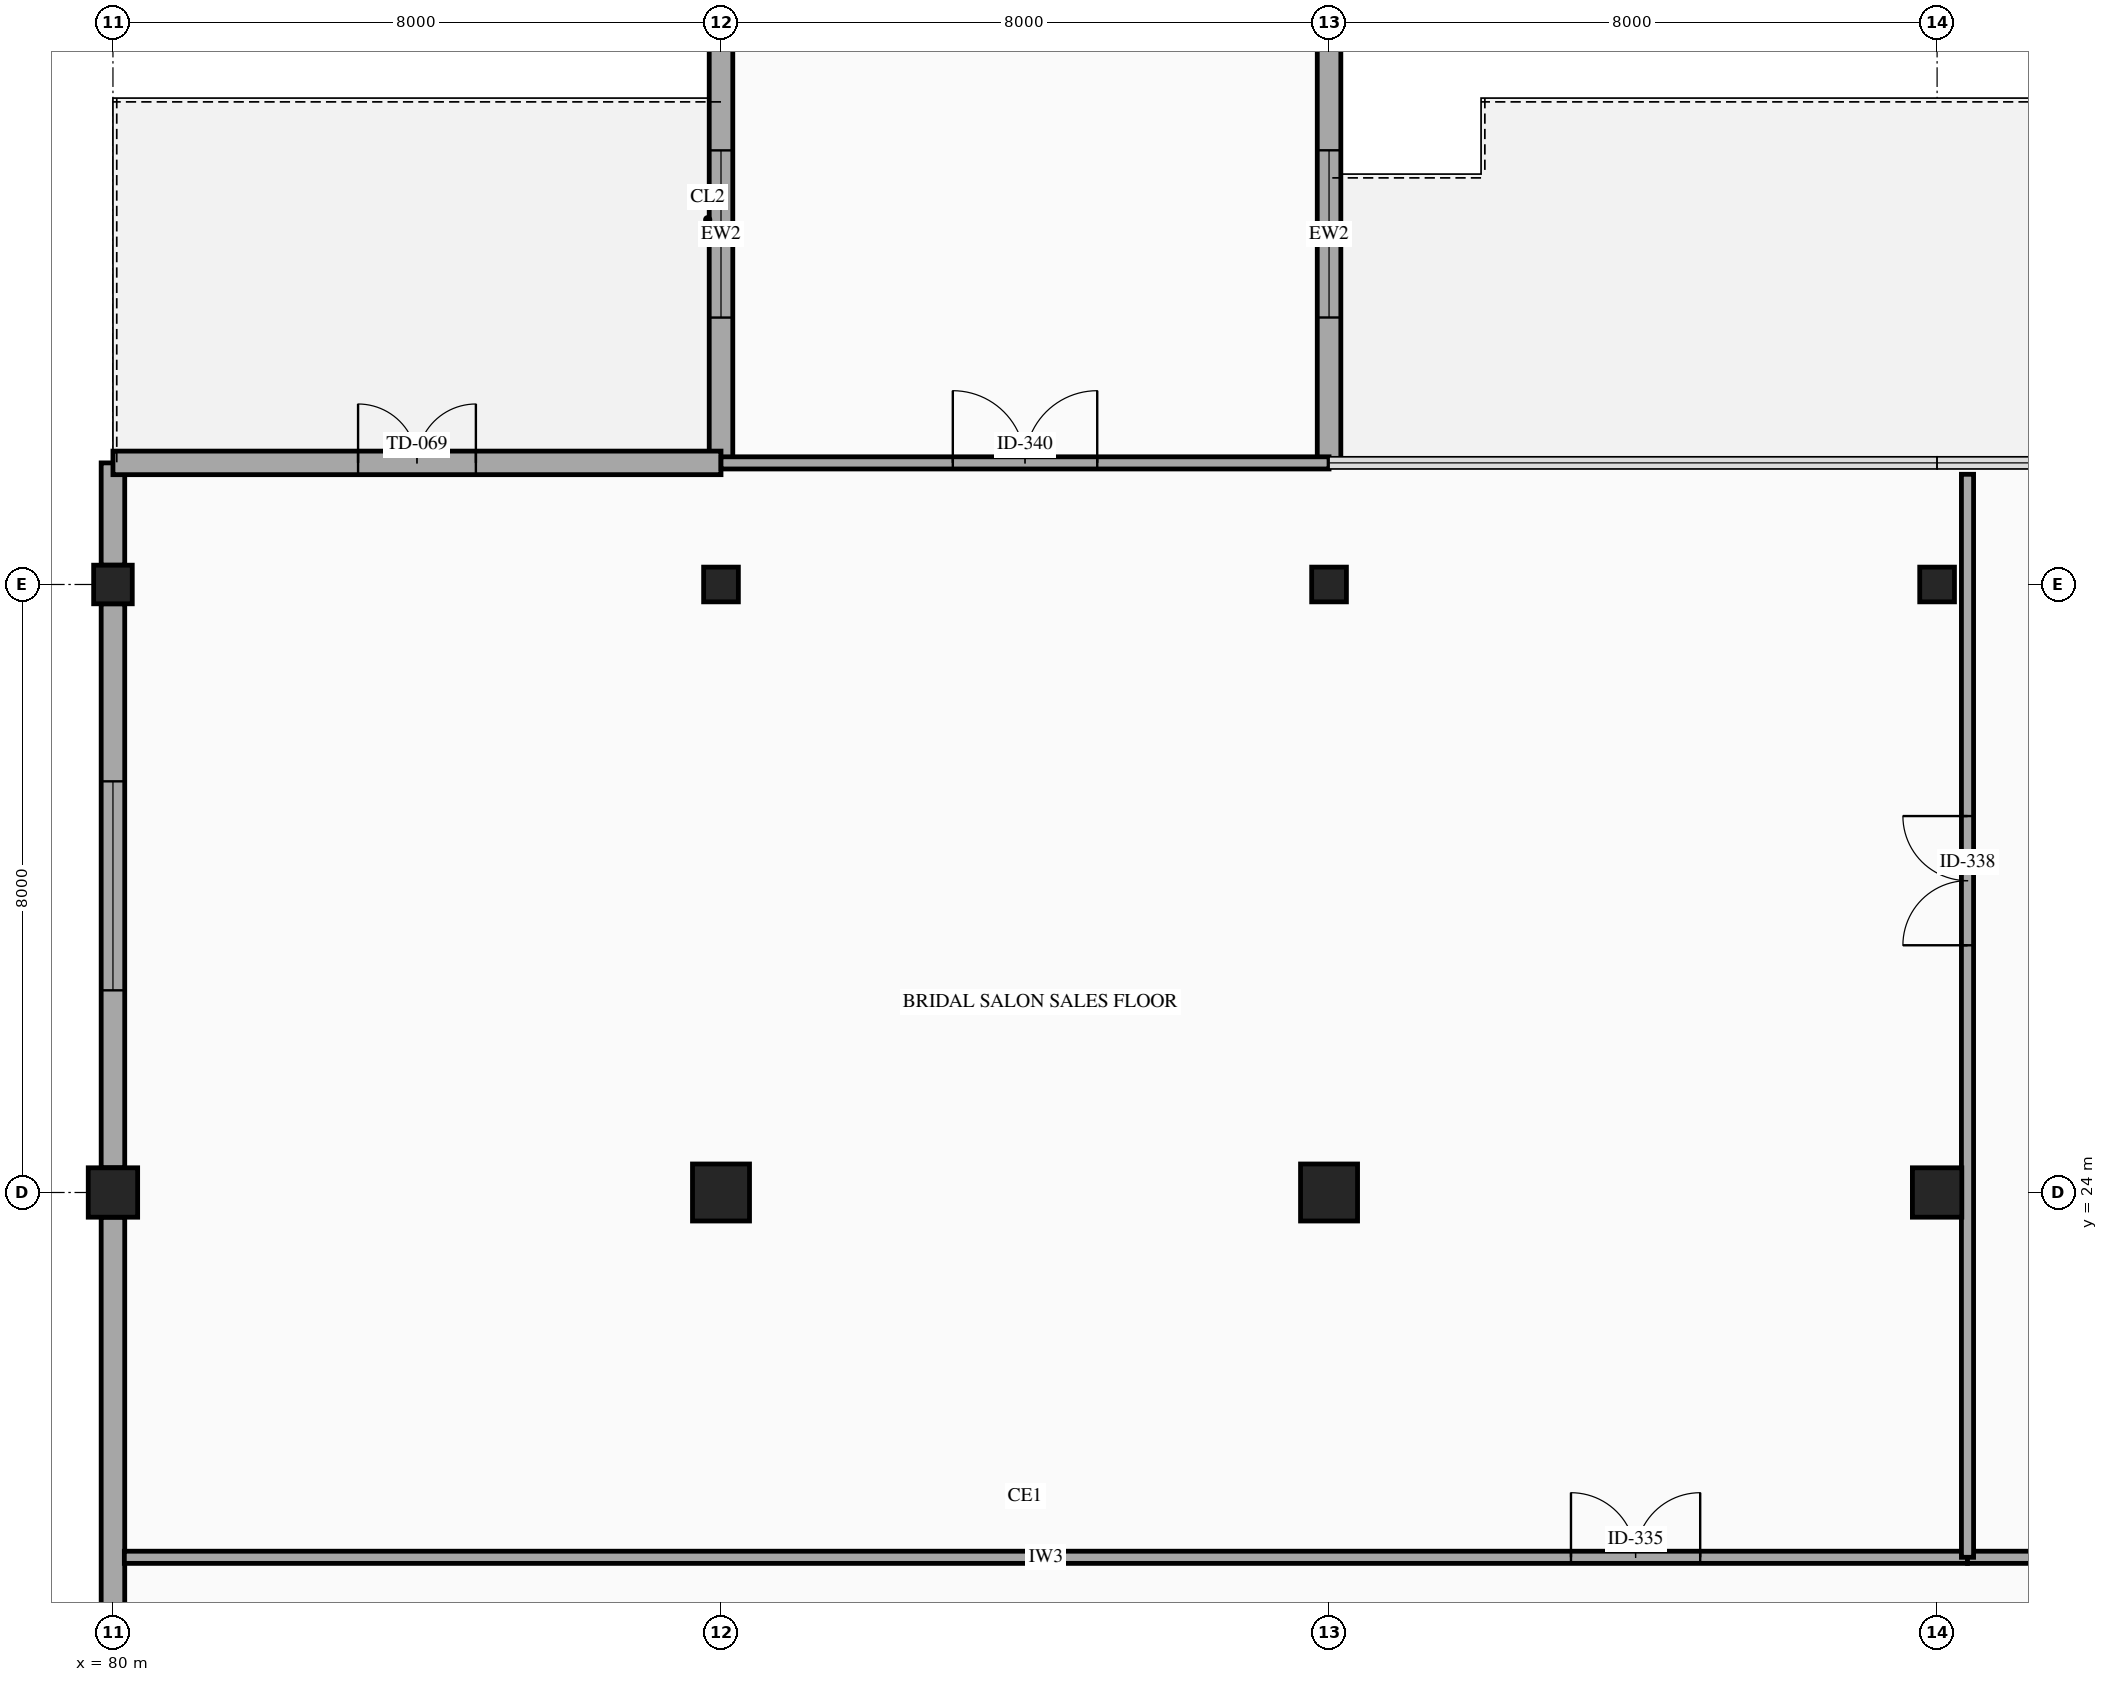
"""IFC4 building model, lengths in metres.
Left out: names, types, materials, properties, quantities, classifications, styles, units other than length and angle.
Written with IfcOpenShell. Run it as: python <this file> out.ifc"""

import sys

from ifc_helpers import new_model, si_unit, direction, frame, frame_2d, origin, origin_2d, place, context, subcontext, project, spatial, rectangle, hollow_circle, extrude, element, fill, save


model = new_model("IFC4")
c1 = context("Model", 3, precision=1e-05, world=origin(), true_north=direction((0.0, 1.0)))
c2 = subcontext(c1, "Body", "Model", "MODEL_VIEW")
j1 = project(units=[si_unit("LENGTHUNIT", "METRE"), si_unit("PLANEANGLEUNIT", "RADIAN")], contexts=[c1])
p1 = place(None, origin())
s1 = spatial("IfcSite", under=j1, at=p1, CompositionType="ELEMENT")
p2 = place(p1, origin())
s2 = spatial("IfcBuilding", under=s1, at=p2, CompositionType="ELEMENT")
p3 = place(p2, frame((0.0, 0.0, 14.9)))
s3 = spatial("IfcBuildingStorey", under=s2, at=p3, CompositionType="ELEMENT", Elevation=14.9)
p4 = place(p3, frame((80.0, 24.0, 0.0), z_axis=(0.0, 0.0, 1.0), x_axis=(1.0, 0.0, 0.0)))
e1 = element("IfcColumn", 1, at=p4, inside=s3, PredefinedType="COLUMN", context=c2, shape_type="SweptSolid", body=[
    extrude(rectangle(XDim=0.65, YDim=0.65, at=origin_2d()), origin(), (0.0, 0.0, 1.0), 4.5),
])
p5 = place(p3, frame((80.0, 32.0, 0.0), z_axis=(0.0, 0.0, 1.0), x_axis=(1.0, 0.0, 0.0)))
e2 = element("IfcColumn", 2, at=p5, inside=s3, PredefinedType="COLUMN", context=c2, shape_type="SweptSolid", body=[
    extrude(hollow_circle(Radius=0.254, WallThickness=0.012, at=origin_2d()), origin(), (0.0, 0.0, 1.0), 4.5),
])
p6 = place(p3, frame((88.0, 24.0, 0.0), z_axis=(0.0, 0.0, 1.0), x_axis=(1.0, 0.0, 0.0)))
e3 = element("IfcColumn", 3, at=p6, inside=s3, PredefinedType="COLUMN", context=c2, shape_type="SweptSolid", body=[
    extrude(rectangle(XDim=0.75, YDim=0.75, at=origin_2d()), origin(), (0.0, 0.0, 1.0), 4.5),
])
p7 = place(p3, frame((88.0, 32.0, 0.0), z_axis=(0.0, 0.0, 1.0), x_axis=(1.0, 0.0, 0.0)))
e4 = element("IfcColumn", 4, at=p7, inside=s3, PredefinedType="COLUMN", context=c2, shape_type="SweptSolid", body=[
    extrude(hollow_circle(Radius=0.229, WallThickness=0.012, at=origin_2d()), origin(), (0.0, 0.0, 1.0), 4.5),
])
p8 = place(p3, frame((96.0, 24.0, 0.0), z_axis=(0.0, 0.0, 1.0), x_axis=(1.0, 0.0, 0.0)))
e5 = element("IfcColumn", 5, at=p8, inside=s3, PredefinedType="COLUMN", context=c2, shape_type="SweptSolid", body=[
    extrude(rectangle(XDim=0.75, YDim=0.75, at=origin_2d()), origin(), (0.0, 0.0, 1.0), 4.5),
])
p9 = place(p3, frame((96.0, 32.0, 0.0), z_axis=(0.0, 0.0, 1.0), x_axis=(1.0, 0.0, 0.0)))
e6 = element("IfcColumn", 6, at=p9, inside=s3, PredefinedType="COLUMN", context=c2, shape_type="SweptSolid", body=[
    extrude(hollow_circle(Radius=0.229, WallThickness=0.012, at=origin_2d()), origin(), (0.0, 0.0, 1.0), 4.5),
])
p10 = place(p3, frame((104.0, 24.0, 0.0), z_axis=(0.0, 0.0, 1.0), x_axis=(1.0, 0.0, 0.0)))
e7 = element("IfcColumn", 7, at=p10, inside=s3, PredefinedType="COLUMN", context=c2, shape_type="SweptSolid", body=[
    extrude(rectangle(XDim=0.65, YDim=0.65, at=origin_2d()), origin(), (0.0, 0.0, 1.0), 4.5),
])
p11 = place(p3, frame((104.0, 32.0, 0.0), z_axis=(0.0, 0.0, 1.0), x_axis=(1.0, 0.0, 0.0)))
e8 = element("IfcColumn", 8, at=p11, inside=s3, PredefinedType="COLUMN", context=c2, shape_type="SweptSolid", body=[
    extrude(hollow_circle(Radius=0.229, WallThickness=0.012, at=origin_2d()), origin(), (0.0, 0.0, 1.0), 4.5),
])
p12 = place(p3, frame((88.0, 33.6, 0.0), z_axis=(0.0, 0.0, 1.0), x_axis=(0.0, 1.0, 0.0)))
e9 = element("IfcWall", 9, at=p12, inside=s3, PredefinedType="STANDARD", context=c2, shape_type="SweptSolid", body=[
    extrude(rectangle(XDim=6.025, YDim=0.31, at=frame_2d((3.012, 0.0))), origin(), (0.0, 0.0, 1.0), 3.48),
])
p13 = place(p12, frame((1.912, 0.0, 0.8)))
e10 = element("IfcOpeningElement", 10, at=p13, cuts=e9, PredefinedType="OPENING", context=c2, shape_type="SweptSolid", body=[
    extrude(rectangle(XDim=2.2, YDim=2.05, at=frame_2d((1.1, 1.025))), frame((0.0, 0.165, 0.0), z_axis=(0.0, -1.0, 0.0), x_axis=(1.0, 0.0, 0.0)), (0.0, 0.0, 1.0), 0.33),
])
p14 = place(p3, frame((96.0, 39.625, 0.0), z_axis=(0.0, 0.0, 1.0), x_axis=(0.0, -1.0, 0.0)))
e11 = element("IfcWall", 11, at=p14, inside=s3, PredefinedType="STANDARD", context=c2, shape_type="SweptSolid", body=[
    extrude(rectangle(XDim=6.025, YDim=0.31, at=frame_2d((3.012, 0.0))), origin(), (0.0, 0.0, 1.0), 3.48),
])
p15 = place(p14, frame((1.912, 0.0, 0.8)))
e12 = element("IfcOpeningElement", 12, at=p15, cuts=e11, PredefinedType="OPENING", context=c2, shape_type="SweptSolid", body=[
    extrude(rectangle(XDim=2.2, YDim=2.05, at=frame_2d((1.1, 1.025))), frame((0.0, 0.165, 0.0), z_axis=(0.0, -1.0, 0.0), x_axis=(1.0, 0.0, 0.0)), (0.0, 0.0, 1.0), 0.33),
])
p16 = place(p3, frame((80.0, 16.375, 0.0), z_axis=(0.0, 0.0, 1.0), x_axis=(0.0, 1.0, 0.0)))
e13 = element("IfcWall", 13, at=p16, inside=s3, PredefinedType="STANDARD", context=c2, shape_type="SweptSolid", body=[
    extrude(rectangle(XDim=7.3, YDim=0.31, at=frame_2d((3.65, 0.0))), origin(), (0.0, 0.0, 1.0), 3.48),
])
p17 = place(p3, frame((80.0, 24.325, 0.0), z_axis=(0.0, 0.0, 1.0), x_axis=(0.0, 1.0, 0.0)))
e14 = element("IfcWall", 14, at=p17, inside=s3, PredefinedType="STANDARD", context=c2, shape_type="SweptSolid", body=[
    extrude(rectangle(XDim=7.421, YDim=0.31, at=frame_2d((3.71, 0.0))), origin(), (0.0, 0.0, 1.0), 3.48),
])
p18 = place(p17, frame((2.335, 0.0, 0.8)))
e15 = element("IfcOpeningElement", 15, at=p18, cuts=e14, PredefinedType="OPENING", context=c2, shape_type="SweptSolid", body=[
    extrude(rectangle(XDim=2.75, YDim=2.15, at=frame_2d((1.375, 1.075))), frame((0.0, 0.165, 0.0), z_axis=(0.0, -1.0, 0.0), x_axis=(1.0, 0.0, 0.0)), (0.0, 0.0, 1.0), 0.33),
])
p19 = place(p3, frame((80.0, 32.254, 0.0), z_axis=(0.0, 0.0, 1.0), x_axis=(0.0, 1.0, 0.0)))
e16 = element("IfcWall", 16, at=p19, inside=s3, PredefinedType="STANDARD", context=c2, shape_type="SweptSolid", body=[
    extrude(rectangle(XDim=1.346, YDim=0.31, at=frame_2d((0.673, 0.0))), origin(), (0.0, 0.0, 1.0), 3.48),
])
p20 = place(p3, frame((80.0, 33.6, 0.0), z_axis=(0.0, 0.0, 1.0), x_axis=(1.0, 0.0, 0.0)))
e17 = element("IfcWall", 17, at=p20, inside=s3, PredefinedType="STANDARD", context=c2, shape_type="SweptSolid", body=[
    extrude(rectangle(XDim=8.0, YDim=0.31, at=frame_2d((4.0, 0.0))), origin(), (0.0, 0.0, 1.0), 3.48),
])
p21 = place(p20, frame((3.225, 0.0, 0.0)))
e18 = element("IfcOpeningElement", 18, at=p21, cuts=e17, PredefinedType="OPENING", context=c2, shape_type="SweptSolid", body=[
    extrude(rectangle(XDim=1.55, YDim=2.15, at=frame_2d((0.775, 1.075))), frame((0.0, 0.165, 0.0), z_axis=(0.0, -1.0, 0.0), x_axis=(1.0, 0.0, 0.0)), (0.0, 0.0, 1.0), 0.33),
])
p22 = place(p3, frame((80.15, 19.2, 0.0), z_axis=(0.0, 0.0, 1.0), x_axis=(1.0, 0.0, 0.0)))
e19 = element("IfcWall", 19, at=p22, inside=s3, PredefinedType="PARTITIONING", context=c2, shape_type="SweptSolid", body=[
    extrude(rectangle(XDim=24.25, YDim=0.16, at=frame_2d((12.125, 0.0))), origin(), (0.0, 0.0, 1.0), 3.48),
])
p23 = place(p22, frame((19.033, 0.0, 0.0)))
e20 = element("IfcOpeningElement", 20, at=p23, cuts=e19, PredefinedType="OPENING", context=c2, shape_type="SweptSolid", body=[
    extrude(rectangle(XDim=1.7, YDim=2.25, at=frame_2d((0.85, 1.125))), frame((0.0, 0.09, 0.0), z_axis=(0.0, -1.0, 0.0), x_axis=(1.0, 0.0, 0.0)), (0.0, 0.0, 1.0), 0.18),
])
p24 = place(p3, frame((104.4, 19.2, 0.0), z_axis=(0.0, 0.0, 1.0), x_axis=(1.0, 0.0, 0.0)))
e21 = element("IfcWall", 21, at=p24, inside=s3, PredefinedType="PARTITIONING", context=c2, shape_type="SweptSolid", body=[
    extrude(rectangle(XDim=20.0, YDim=0.16, at=frame_2d((10.0, 0.0))), origin(), (0.0, 0.0, 1.0), 3.48),
])
p25 = place(p24, frame((2.82, 0.0, 0.0)))
e22 = element("IfcOpeningElement", 22, at=p25, cuts=e21, PredefinedType="OPENING", context=c2, shape_type="SweptSolid", body=[
    extrude(rectangle(XDim=1.7, YDim=2.25, at=frame_2d((0.85, 1.125))), frame((0.0, 0.09, 0.0), z_axis=(0.0, -1.0, 0.0), x_axis=(1.0, 0.0, 0.0)), (0.0, 0.0, 1.0), 0.18),
])
p26 = place(p3, frame((104.4, 19.2, 0.0), z_axis=(0.0, 0.0, 1.0), x_axis=(0.0, 1.0, 0.0)))
e23 = element("IfcWall", 23, at=p26, inside=s3, PredefinedType="PARTITIONING", context=c2, shape_type="SweptSolid", body=[
    extrude(rectangle(XDim=14.25, YDim=0.16, at=frame_2d((7.125, 0.0))), origin(), (0.0, 0.0, 1.0), 3.48),
])
p27 = place(p26, frame((8.053, 0.0, 0.0)))
e24 = element("IfcOpeningElement", 24, at=p27, cuts=e23, PredefinedType="OPENING", context=c2, shape_type="SweptSolid", body=[
    extrude(rectangle(XDim=1.7, YDim=2.25, at=frame_2d((0.85, 1.125))), frame((0.0, 0.09, 0.0), z_axis=(0.0, -1.0, 0.0), x_axis=(1.0, 0.0, 0.0)), (0.0, 0.0, 1.0), 0.18),
])
p28 = place(p3, frame((88.0, 33.6, 0.0), z_axis=(0.0, 0.0, 1.0), x_axis=(1.0, 0.0, 0.0)))
e25 = element("IfcWall", 25, at=p28, inside=s3, PredefinedType="PARTITIONING", context=c2, shape_type="SweptSolid", body=[
    extrude(rectangle(XDim=8.0, YDim=0.16, at=frame_2d((4.0, 0.0))), origin(), (0.0, 0.0, 1.0), 3.48),
])
p29 = place(p28, frame((3.05, 0.0, 0.0)))
e26 = element("IfcOpeningElement", 26, at=p29, cuts=e25, PredefinedType="OPENING", context=c2, shape_type="SweptSolid", body=[
    extrude(rectangle(XDim=1.9, YDim=2.3, at=frame_2d((0.95, 1.15))), frame((0.0, 0.09, 0.0), z_axis=(0.0, -1.0, 0.0), x_axis=(1.0, 0.0, 0.0)), (0.0, 0.0, 1.0), 0.18),
])
p30 = place(p13, origin())
e27 = element("IfcWindow", 27, at=p30, inside=s3, PartitioningType="DOUBLE_PANEL_VERTICAL", PredefinedType="WINDOW", context=c2, shape_type="SweptSolid", body=[
    extrude(rectangle(XDim=2.2, YDim=2.05, at=frame_2d((1.1, 1.025))), frame((0.0, 0.03, 0.0), z_axis=(0.0, -1.0, 0.0), x_axis=(1.0, 0.0, 0.0)), (0.0, 0.0, 1.0), 0.06),
])
fill(e10, e27)
p31 = place(p15, origin())
e28 = element("IfcWindow", 28, at=p31, inside=s3, PartitioningType="DOUBLE_PANEL_VERTICAL", PredefinedType="WINDOW", context=c2, shape_type="SweptSolid", body=[
    extrude(rectangle(XDim=2.2, YDim=2.05, at=frame_2d((1.1, 1.025))), frame((0.0, 0.03, 0.0), z_axis=(0.0, -1.0, 0.0), x_axis=(1.0, 0.0, 0.0)), (0.0, 0.0, 1.0), 0.06),
])
fill(e12, e28)
p32 = place(p18, origin())
e29 = element("IfcWindow", 29, at=p32, inside=s3, PartitioningType="TRIPLE_PANEL_VERTICAL", PredefinedType="WINDOW", context=c2, shape_type="SweptSolid", body=[
    extrude(rectangle(XDim=2.75, YDim=2.15, at=frame_2d((1.375, 1.075))), frame((0.0, 0.03, 0.0), z_axis=(0.0, -1.0, 0.0), x_axis=(1.0, 0.0, 0.0)), (0.0, 0.0, 1.0), 0.06),
])
fill(e15, e29)
p33 = place(p21, origin())
e30 = element("IfcDoor", 30, at=p33, inside=s3, OperationType="DOUBLE_DOOR_SINGLE_SWING", PredefinedType="DOOR", context=c2, shape_type="SweptSolid", body=[
    extrude(rectangle(XDim=1.55, YDim=2.15, at=frame_2d((0.775, 1.075))), frame((0.0, 0.025, 0.0), z_axis=(0.0, -1.0, 0.0), x_axis=(1.0, 0.0, 0.0)), (0.0, 0.0, 1.0), 0.05),
])
fill(e18, e30)
p34 = place(p23, origin())
e31 = element("IfcDoor", 31, at=p34, inside=s3, OperationType="DOUBLE_DOOR_SINGLE_SWING", PredefinedType="DOOR", context=c2, shape_type="SweptSolid", body=[
    extrude(rectangle(XDim=1.7, YDim=2.25, at=frame_2d((0.85, 1.125))), frame((0.0, 0.025, 0.0), z_axis=(0.0, -1.0, 0.0), x_axis=(1.0, 0.0, 0.0)), (0.0, 0.0, 1.0), 0.05),
])
fill(e20, e31)
p35 = place(p27, origin())
e32 = element("IfcDoor", 32, at=p35, inside=s3, OperationType="DOUBLE_DOOR_SINGLE_SWING", PredefinedType="DOOR", context=c2, shape_type="SweptSolid", body=[
    extrude(rectangle(XDim=1.7, YDim=2.25, at=frame_2d((0.85, 1.125))), frame((0.0, 0.025, 0.0), z_axis=(0.0, -1.0, 0.0), x_axis=(1.0, 0.0, 0.0)), (0.0, 0.0, 1.0), 0.05),
])
fill(e24, e32)
p36 = place(p29, origin())
e33 = element("IfcDoor", 33, at=p36, inside=s3, OperationType="DOUBLE_DOOR_SINGLE_SWING", PredefinedType="DOOR", context=c2, shape_type="SweptSolid", body=[
    extrude(rectangle(XDim=1.9, YDim=2.3, at=frame_2d((0.95, 1.15))), frame((0.0, 0.025, 0.0), z_axis=(0.0, -1.0, 0.0), x_axis=(1.0, 0.0, 0.0)), (0.0, 0.0, 1.0), 0.05),
])
fill(e26, e33)
save(model, sys.argv[1])
